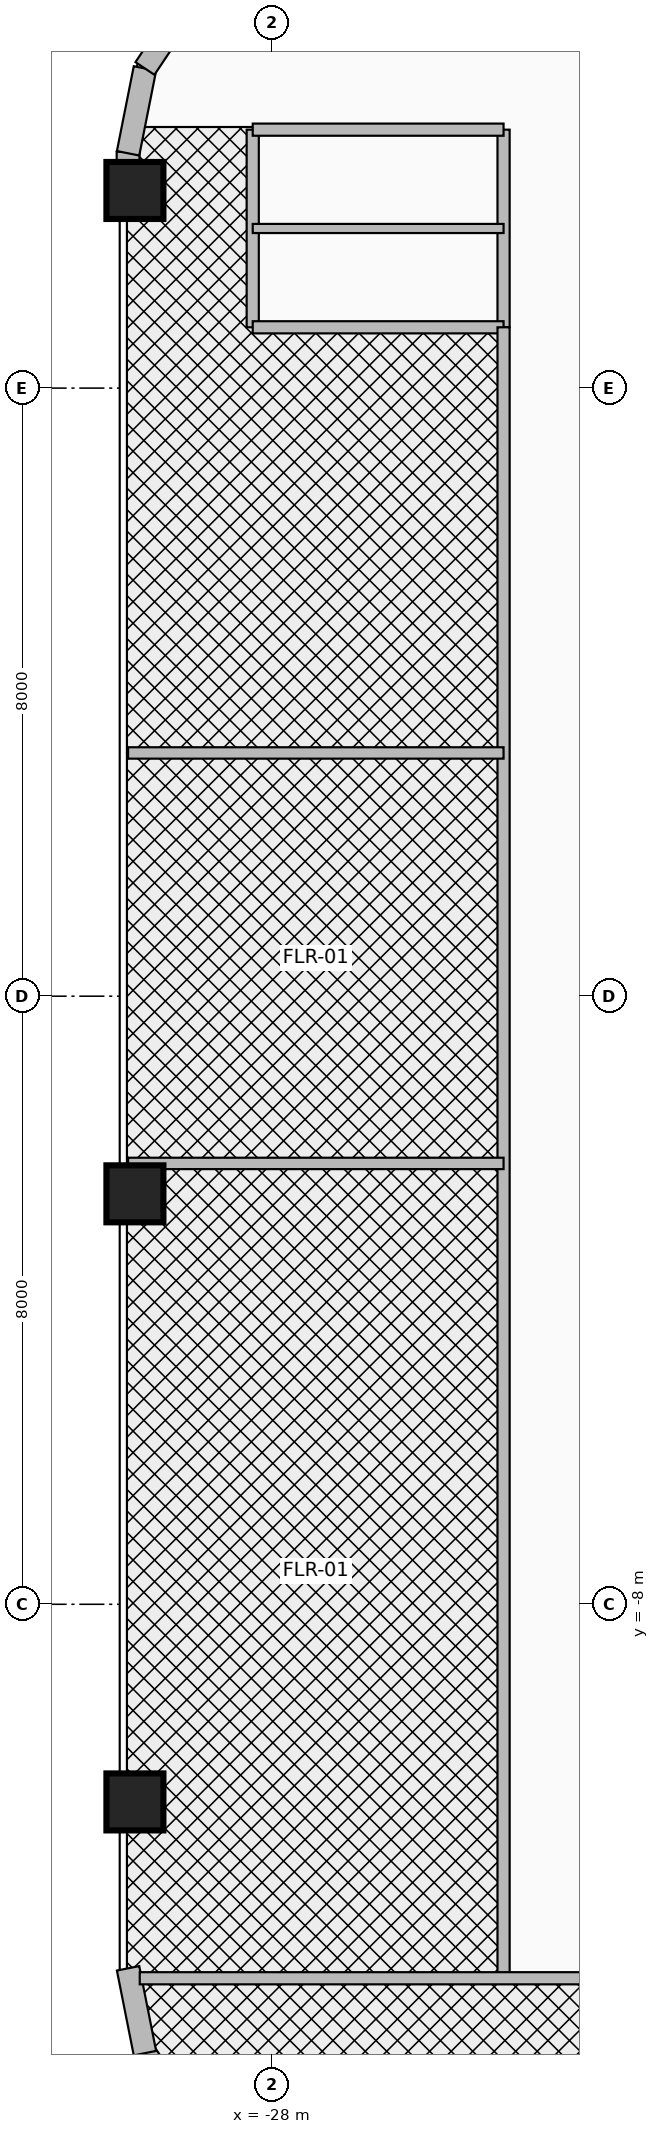
"""IFC4 building model, lengths in metres.
Left out: names, types, materials, properties, quantities, classifications, styles, units other than length and angle.
Written with IfcOpenShell. Run it as: python <this file> out.ifc"""

import sys

from ifc_helpers import new_model, si_unit, direction, frame, frame_2d, origin, origin_2d, place, context, subcontext, project, spatial, rectangle, extrude, source, transform, mapped, element, fill, save


model = new_model("IFC4")
c1 = context("Model", 3, precision=1e-05, world=origin(), true_north=direction((0.0, 1.0)))
c2 = subcontext(c1, "Body", "Model", "MODEL_VIEW")
j1 = project(units=[si_unit("LENGTHUNIT", "METRE"), si_unit("PLANEANGLEUNIT", "RADIAN")], contexts=[c1])
p1 = place(None, origin())
s1 = spatial("IfcSite", under=j1, at=p1, CompositionType="ELEMENT")
p2 = place(p1, origin())
s2 = spatial("IfcBuilding", under=s1, at=p2, CompositionType="ELEMENT")
p3 = place(p2, frame((0.0, 0.0, 290.6)))
s3 = spatial("IfcBuildingStorey", under=s2, at=p3, CompositionType="ELEMENT", Elevation=290.6)
m1 = source(origin(), c2, "Body", "SweptSolid", [
    extrude(rectangle(XDim=0.75, YDim=0.75, at=origin_2d()), origin(), (0.0, 0.0, 1.0), 3.6),
])
for number, where, z_axis, x_axis in (
    (1, (-29.8, -10.6, 0.0), (0.0, 0.0, 1.0), (1.0, 0.0, 0.0)),
    (2, (-29.8, -2.6, 0.0), (0.0, 0.0, 1.0), (1.0, 0.0, 0.0)),
    (3, (-29.8, 10.6, 0.0), (0.0, 0.0, 1.0), (1.0, 0.0, 0.0)),
):
    element("IfcColumn", number, at=place(p3, frame(where, z_axis=z_axis, x_axis=x_axis)), inside=s3, PredefinedType="COLUMN", context=c2, shape_type="MappedRepresentation", body=[
        mapped(m1, transform((0.0, 0.0, 0.0), x_axis=(1.0, 0.0, 0.0), y_axis=(0.0, 1.0, 0.0), z_axis=(0.0, 0.0, 1.0), scale=1.0)),
    ])
p4 = place(p3, frame((-29.89, 10.98, 0.0), z_axis=(0.0, 0.0, 1.0), x_axis=(0.0, 1.0, 0.0)))
e4 = element("IfcWall", 4, at=p4, inside=s3, PredefinedType="SOLIDWALL", context=c2, shape_type="SweptSolid", body=[
    extrude(rectangle(XDim=0.129, YDim=0.3, at=frame_2d((0.064, 0.0))), origin(), (0.0, 0.0, 1.0), 2.806),
])
p5 = place(p3, frame((-29.89, 11.089, 0.0), z_axis=(0.0, 0.0, 1.0), x_axis=(0.195043173023, 0.980794657743, 0.0)))
e5 = element("IfcWall", 5, at=p5, inside=s3, PredefinedType="SOLIDWALL", context=c2, shape_type="SweptSolid", body=[
    extrude(rectangle(XDim=1.138, YDim=0.3, at=frame_2d((0.569, 0.0))), origin(), (0.0, 0.0, 1.0), 2.806),
])
p6 = place(p3, frame((-29.668, 12.205, 0.0), z_axis=(0.0, 0.0, 1.0), x_axis=(0.555499891703, 0.831516608564, 0.0)))
e6 = element("IfcWall", 6, at=p6, inside=s3, PredefinedType="SOLIDWALL", context=c2, shape_type="SweptSolid", body=[
    extrude(rectangle(XDim=1.127, YDim=0.3, at=frame_2d((0.563, 0.0))), origin(), (0.0, 0.0, 1.0), 2.806),
])
p7 = place(p3, frame((-29.042, -14.842, 0.0), z_axis=(0.0, 0.0, 1.0), x_axis=(-0.555599979619, 0.831449735491, 0.0)))
e7 = element("IfcWall", 7, at=p7, inside=s3, PredefinedType="SOLIDWALL", context=c2, shape_type="SweptSolid", body=[
    extrude(rectangle(XDim=1.127, YDim=0.3, at=frame_2d((0.563, 0.0))), origin(), (0.0, 0.0, 1.0), 3.36),
])
p8 = place(p3, frame((-29.668, -13.905, 0.0), z_axis=(0.0, 0.0, 1.0), x_axis=(-0.195043173023, 0.980794657743, 0.0)))
e8 = element("IfcWall", 8, at=p8, inside=s3, PredefinedType="SOLIDWALL", context=c2, shape_type="SweptSolid", body=[
    extrude(rectangle(XDim=1.138, YDim=0.3, at=frame_2d((0.569, 0.0))), origin(), (0.0, 0.0, 1.0), 3.36),
])
p9 = place(p3, frame((-28.25, 8.8, 0.0), z_axis=(0.0, 0.0, 1.0), x_axis=(0.0, 1.0, 0.0)))
e9 = element("IfcWall", 9, at=p9, inside=s3, PredefinedType="PARTITIONING", context=c2, shape_type="SweptSolid", body=[
    extrude(rectangle(XDim=2.6, YDim=0.16, at=frame_2d((1.3, 0.0))), origin(), (0.0, 0.0, 1.0), 2.723),
])
p10 = place(p3, frame((-24.95, 8.8, 0.0), z_axis=(0.0, 0.0, 1.0), x_axis=(0.0, 1.0, 0.0)))
e10 = element("IfcWall", 10, at=p10, inside=s3, PredefinedType="PARTITIONING", context=c2, shape_type="SweptSolid", body=[
    extrude(rectangle(XDim=2.6, YDim=0.16, at=frame_2d((1.3, 0.0))), origin(), (0.0, 0.0, 1.0), 2.723),
])
p11 = place(p10, frame((0.3, 0.0, 0.0)))
e11 = element("IfcOpeningElement", 11, at=p11, cuts=e10, PredefinedType="OPENING", context=c2, shape_type="SweptSolid", body=[
    extrude(rectangle(XDim=0.85, YDim=2.1, at=frame_2d((0.425, 1.05))), frame((0.0, 0.095, 0.0), z_axis=(0.0, -1.0, 0.0), x_axis=(1.0, 0.0, 0.0)), (0.0, 0.0, 1.0), 0.19),
])
p12 = place(p10, frame((1.45, 0.0, 0.0)))
e12 = element("IfcOpeningElement", 12, at=p12, cuts=e10, PredefinedType="OPENING", context=c2, shape_type="SweptSolid", body=[
    extrude(rectangle(XDim=0.85, YDim=2.1, at=frame_2d((0.425, 1.05))), frame((0.0, 0.095, 0.0), z_axis=(0.0, -1.0, 0.0), x_axis=(1.0, 0.0, 0.0)), (0.0, 0.0, 1.0), 0.19),
])
for number, where, z_axis, x_axis in (
    (13, (-28.25, 8.8, 0.0), (0.0, 0.0, 1.0), (1.0, 0.0, 0.0)),
    (14, (-28.25, 11.4, 0.0), (0.0, 0.0, 1.0), (1.0, 0.0, 0.0)),
):
    element("IfcWall", number, at=place(p3, frame(where, z_axis=z_axis, x_axis=x_axis)), inside=s3, PredefinedType="PARTITIONING", context=c2, shape_type="SweptSolid", body=[
        extrude(rectangle(XDim=3.3, YDim=0.16, at=frame_2d((1.65, 0.0))), origin(), (0.0, 0.0, 1.0), 3.36),
    ])
p13 = place(p3, frame((-28.25, 10.1, 0.0), z_axis=(0.0, 0.0, 1.0), x_axis=(1.0, 0.0, 0.0)))
e15 = element("IfcWall", 15, at=p13, inside=s3, PredefinedType="PARTITIONING", context=c2, shape_type="SweptSolid", body=[
    extrude(rectangle(XDim=3.3, YDim=0.12, at=frame_2d((1.65, 0.0))), origin(), (0.0, 0.0, 1.0), 3.36),
])
p14 = place(p3, frame((-24.95, -12.92, 0.0), z_axis=(0.0, 0.0, 1.0), x_axis=(0.0, 1.0, 0.0)))
e16 = element("IfcWall", 16, at=p14, inside=s3, PredefinedType="PARTITIONING", context=c2, shape_type="SweptSolid", body=[
    extrude(rectangle(XDim=21.72, YDim=0.16, at=frame_2d((10.86, 0.0))), origin(), (0.0, 0.0, 1.0), 2.723),
])
p15 = place(p14, frame((2.5, 0.0, 0.0)))
e17 = element("IfcOpeningElement", 17, at=p15, cuts=e16, PredefinedType="OPENING", context=c2, shape_type="SweptSolid", body=[
    extrude(rectangle(XDim=1.8, YDim=2.15, at=frame_2d((0.9, 1.075))), frame((0.0, 0.095, 0.0), z_axis=(0.0, -1.0, 0.0), x_axis=(1.0, 0.0, 0.0)), (0.0, 0.0, 1.0), 0.19),
])
p16 = place(p14, frame((12.72, 0.0, 0.0)))
e18 = element("IfcOpeningElement", 18, at=p16, cuts=e16, PredefinedType="OPENING", context=c2, shape_type="SweptSolid", body=[
    extrude(rectangle(XDim=1.8, YDim=2.15, at=frame_2d((0.9, 1.075))), frame((0.0, 0.095, 0.0), z_axis=(0.0, -1.0, 0.0), x_axis=(1.0, 0.0, 0.0)), (0.0, 0.0, 1.0), 0.19),
])
p17 = place(p14, frame((17.92, 0.0, 0.0)))
e19 = element("IfcOpeningElement", 19, at=p17, cuts=e16, PredefinedType="OPENING", context=c2, shape_type="SweptSolid", body=[
    extrude(rectangle(XDim=0.9, YDim=2.1, at=frame_2d((0.45, 1.05))), frame((0.0, 0.095, 0.0), z_axis=(0.0, -1.0, 0.0), x_axis=(1.0, 0.0, 0.0)), (0.0, 0.0, 1.0), 0.19),
])
for number, where, z_axis, x_axis in (
    (20, (-29.89, -2.2, 0.0), (0.0, 0.0, 1.0), (1.0, 0.0, 0.0)),
    (21, (-29.89, 3.2, 0.0), (0.0, 0.0, 1.0), (1.0, 0.0, 0.0)),
):
    element("IfcWall", number, at=place(p3, frame(where, z_axis=z_axis, x_axis=x_axis)), inside=s3, PredefinedType="PARTITIONING", context=c2, shape_type="SweptSolid", body=[
        extrude(rectangle(XDim=4.94, YDim=0.15, at=frame_2d((2.47, 0.0))), origin(), (0.0, 0.0, 1.0), 2.806),
    ])
p18 = place(p3, frame((-29.737, -12.92, 0.0), z_axis=(0.0, 0.0, 1.0), x_axis=(1.0, 0.0, 0.0)))
e22 = element("IfcWall", 22, at=p18, inside=s3, PredefinedType="PARTITIONING", context=c2, shape_type="SweptSolid", body=[
    extrude(rectangle(XDim=19.973, YDim=0.16, at=frame_2d((9.987, 0.0))), origin(), (0.0, 0.0, 1.0), 3.36),
])
p19 = place(p18, frame((5.0, 0.0, 0.0)))
e23 = element("IfcOpeningElement", 23, at=p19, cuts=e22, PredefinedType="OPENING", context=c2, shape_type="SweptSolid", body=[
    extrude(rectangle(XDim=0.9, YDim=2.1, at=frame_2d((0.45, 1.05))), frame((0.0, 0.095, 0.0), z_axis=(0.0, -1.0, 0.0), x_axis=(1.0, 0.0, 0.0)), (0.0, 0.0, 1.0), 0.19),
])
p20 = place(p18, frame((14.5, 0.0, 0.0)))
e24 = element("IfcOpeningElement", 24, at=p20, cuts=e22, PredefinedType="OPENING", context=c2, shape_type="SweptSolid", body=[
    extrude(rectangle(XDim=0.9, YDim=2.1, at=frame_2d((0.45, 1.05))), frame((0.0, 0.095, 0.0), z_axis=(0.0, -1.0, 0.0), x_axis=(1.0, 0.0, 0.0)), (0.0, 0.0, 1.0), 0.19),
])
p21 = place(p11, origin())
e25 = element("IfcDoor", 25, at=p21, inside=s3, OperationType="SINGLE_SWING_RIGHT", PredefinedType="DOOR", context=c2, shape_type="SweptSolid", body=[
    extrude(rectangle(XDim=0.85, YDim=2.1, at=frame_2d((0.425, 1.05))), frame((0.0, 0.025, 0.0), z_axis=(0.0, -1.0, 0.0), x_axis=(1.0, 0.0, 0.0)), (0.0, 0.0, 1.0), 0.05),
])
fill(e11, e25)
p22 = place(p12, origin())
e26 = element("IfcDoor", 26, at=p22, inside=s3, OperationType="SINGLE_SWING_LEFT", PredefinedType="DOOR", context=c2, shape_type="SweptSolid", body=[
    extrude(rectangle(XDim=0.85, YDim=2.1, at=frame_2d((0.425, 1.05))), frame((0.0, 0.025, 0.0), z_axis=(0.0, -1.0, 0.0), x_axis=(1.0, 0.0, 0.0)), (0.0, 0.0, 1.0), 0.05),
])
fill(e12, e26)
p23 = place(p15, origin())
e27 = element("IfcDoor", 27, at=p23, inside=s3, OperationType="DOUBLE_DOOR_SINGLE_SWING", PredefinedType="DOOR", context=c2, shape_type="SweptSolid", body=[
    extrude(rectangle(XDim=1.8, YDim=2.15, at=frame_2d((0.9, 1.075))), frame((0.0, 0.025, 0.0), z_axis=(0.0, -1.0, 0.0), x_axis=(1.0, 0.0, 0.0)), (0.0, 0.0, 1.0), 0.05),
])
fill(e17, e27)
p24 = place(p16, frame((1.8, 0.0, 0.0), z_axis=(0.0, 0.0, 1.0), x_axis=(-1.0, 0.0, 0.0)))
e28 = element("IfcDoor", 28, at=p24, inside=s3, OperationType="DOUBLE_DOOR_SINGLE_SWING", PredefinedType="DOOR", context=c2, shape_type="SweptSolid", body=[
    extrude(rectangle(XDim=1.8, YDim=2.15, at=frame_2d((0.9, 1.075))), frame((0.0, 0.025, 0.0), z_axis=(0.0, -1.0, 0.0), x_axis=(1.0, 0.0, 0.0)), (0.0, 0.0, 1.0), 0.05),
])
fill(e18, e28)
p25 = place(p17, origin())
e29 = element("IfcDoor", 29, at=p25, inside=s3, OperationType="SINGLE_SWING_RIGHT", PredefinedType="DOOR", context=c2, shape_type="SweptSolid", body=[
    extrude(rectangle(XDim=0.9, YDim=2.1, at=frame_2d((0.45, 1.05))), frame((0.0, 0.025, 0.0), z_axis=(0.0, -1.0, 0.0), x_axis=(1.0, 0.0, 0.0)), (0.0, 0.0, 1.0), 0.05),
])
fill(e19, e29)
p26 = place(p19, frame((0.9, 0.0, 0.0), z_axis=(0.0, 0.0, 1.0), x_axis=(-1.0, 0.0, 0.0)))
e30 = element("IfcDoor", 30, at=p26, inside=s3, OperationType="SINGLE_SWING_LEFT", PredefinedType="DOOR", context=c2, shape_type="SweptSolid", body=[
    extrude(rectangle(XDim=0.9, YDim=2.1, at=frame_2d((0.45, 1.05))), frame((0.0, 0.025, 0.0), z_axis=(0.0, -1.0, 0.0), x_axis=(1.0, 0.0, 0.0)), (0.0, 0.0, 1.0), 0.05),
])
fill(e23, e30)
save(model, sys.argv[1])
